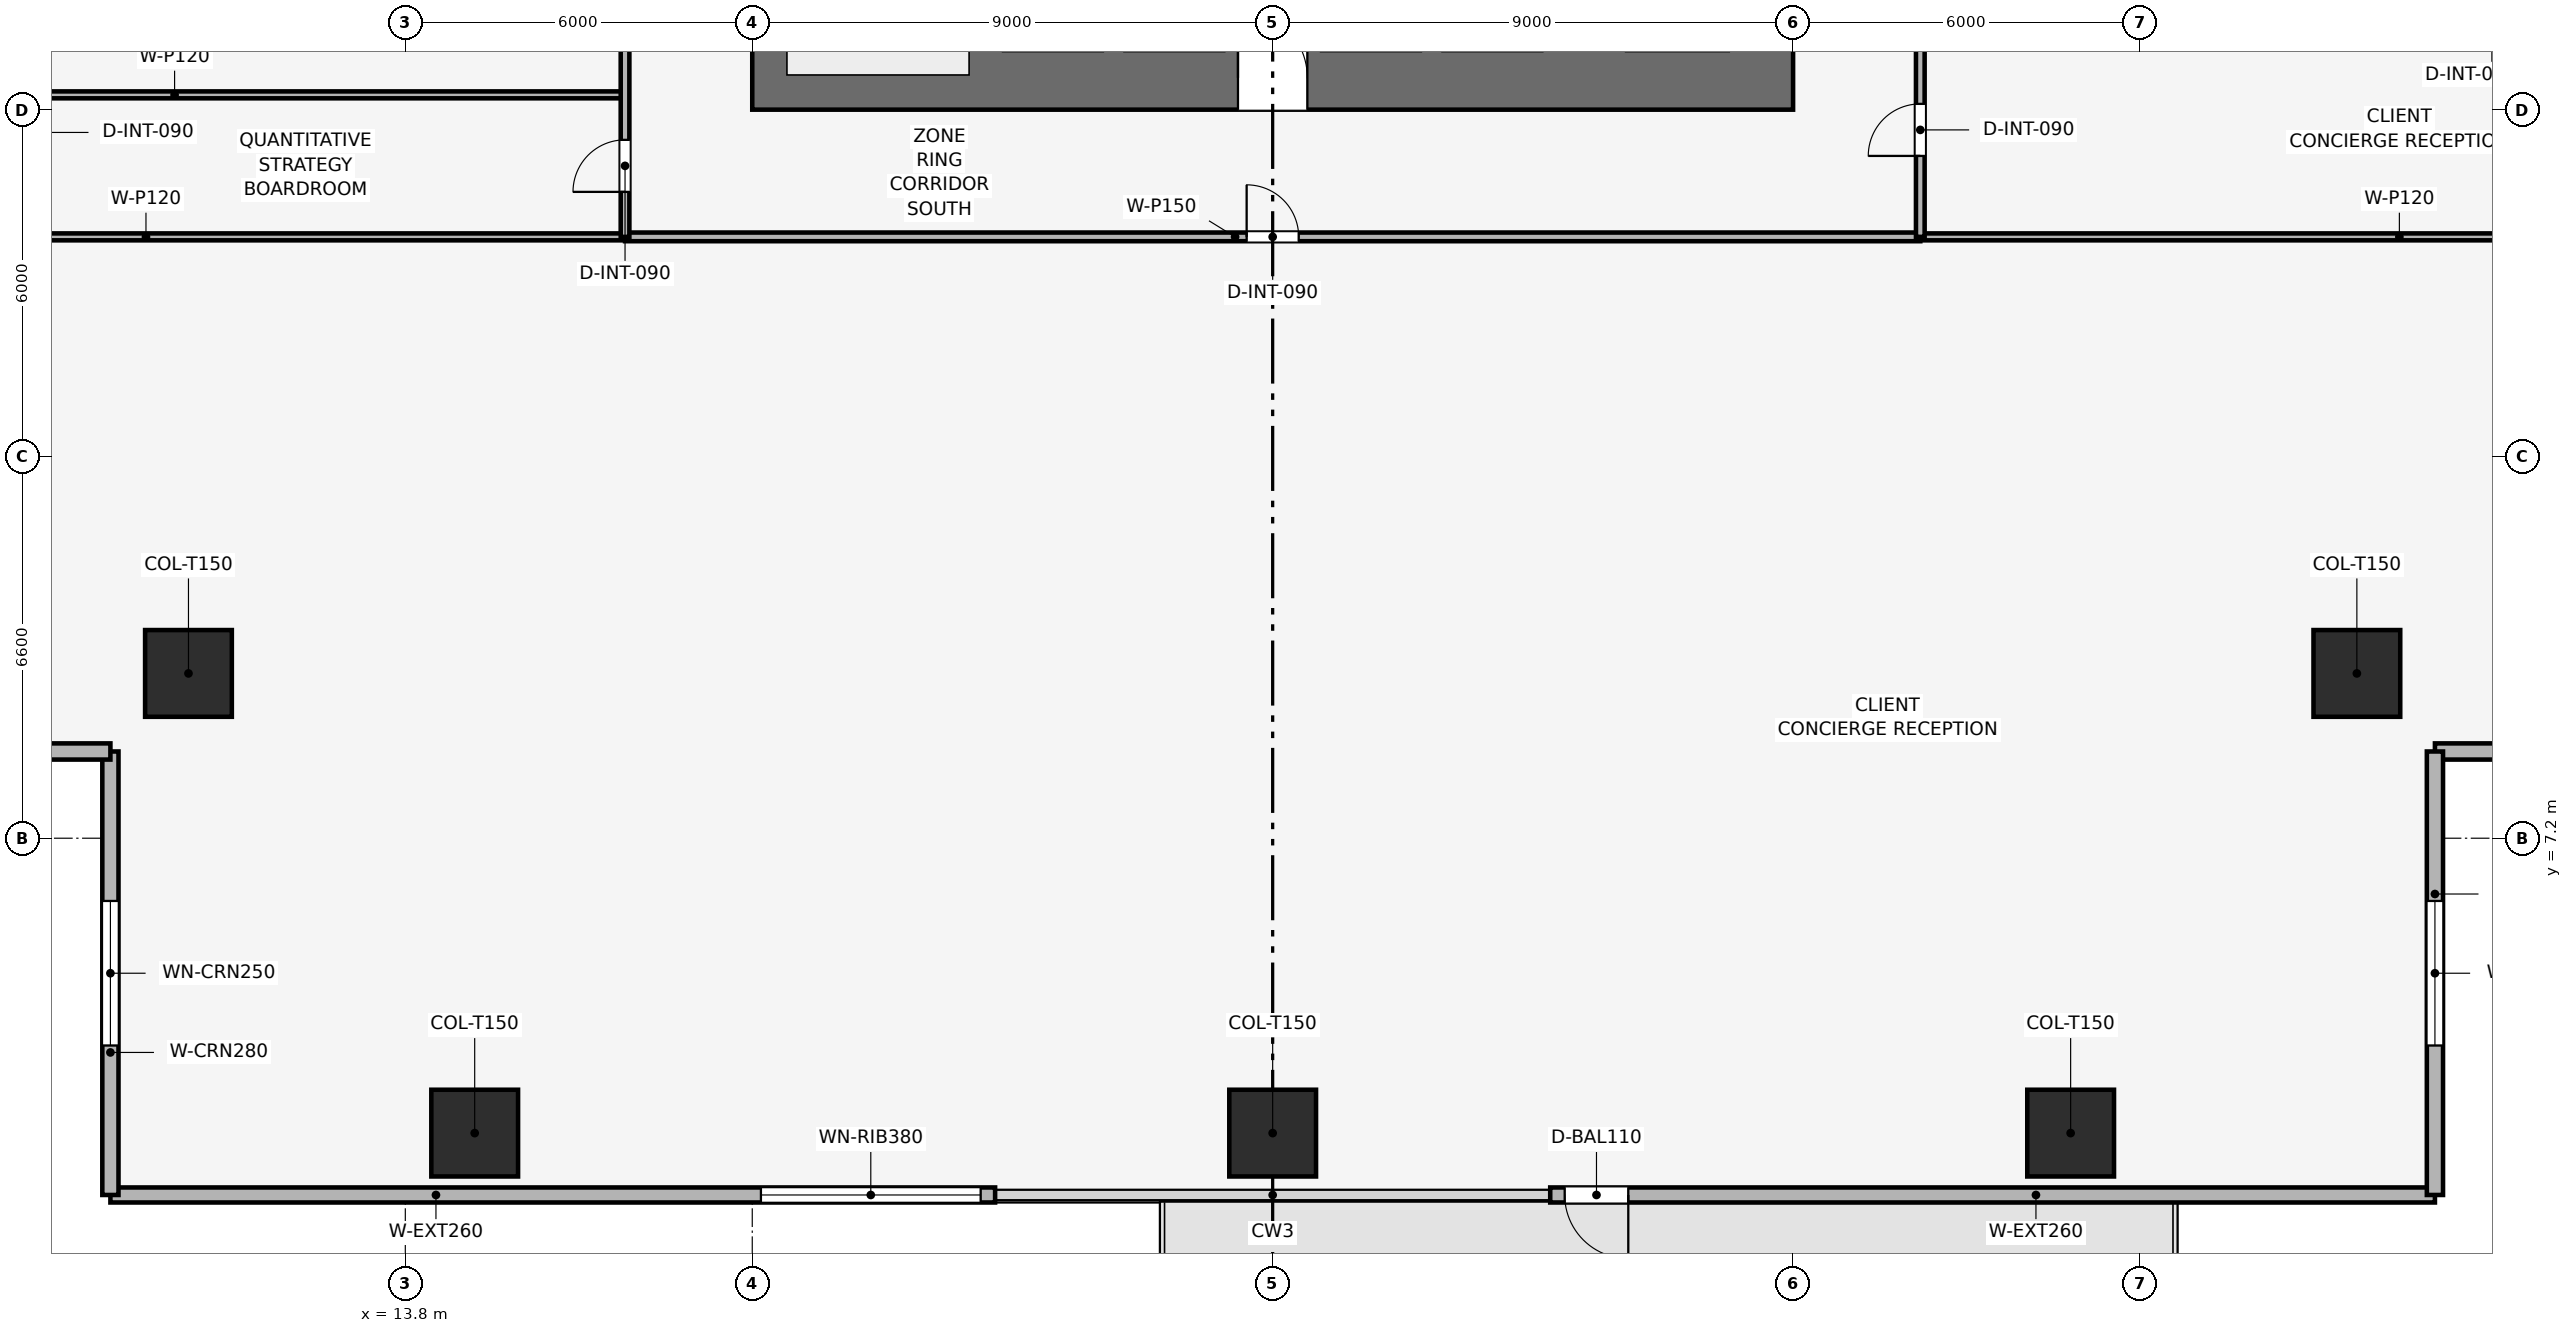
"""IFC4 building model, lengths in metres.
Left out: names, types, materials, properties, quantities, classifications, styles, units other than length and angle.
Written with IfcOpenShell. Run it as: python <this file> out.ifc"""

import sys

from ifc_helpers import new_model, si_unit, direction, frame, frame_2d, origin, origin_2d, place, context, subcontext, project, spatial, rectangle, extrude, element, fill, save


model = new_model("IFC4")
c1 = context("Model", 3, precision=1e-05, world=origin(), true_north=direction((0.0, 1.0)))
c2 = subcontext(c1, "Body", "Model", "MODEL_VIEW")
j1 = project(units=[si_unit("LENGTHUNIT", "METRE"), si_unit("PLANEANGLEUNIT", "RADIAN")], contexts=[c1])
p1 = place(None, origin())
s1 = spatial("IfcSite", under=j1, at=p1, CompositionType="ELEMENT")
p2 = place(p1, origin())
s2 = spatial("IfcBuilding", under=s1, at=p2, CompositionType="ELEMENT")
p3 = place(p2, frame((0.0, 0.0, 45.6)))
s3 = spatial("IfcBuildingStorey", under=s2, at=p3, CompositionType="ELEMENT", Elevation=45.6)
p4 = place(p3, frame((19.8, 20.35, 0.0), z_axis=(0.0, 0.0, 1.0), x_axis=(1.0, 0.0, 0.0)))
e1 = element("IfcWall", 1, at=p4, inside=s3, PredefinedType="SHEAR", context=c2, shape_type="SweptSolid", body=[
    extrude(rectangle(XDim=18.0, YDim=1.1, at=frame_2d((9.0, 0.0))), origin(), (0.0, 0.0, 1.0), 3.9),
])
p5 = place(p4, frame((8.4, 0.0, 0.0)))
e2 = element("IfcOpeningElement", 2, at=p5, cuts=e1, PredefinedType="OPENING", context=c2, shape_type="SweptSolid", body=[
    extrude(rectangle(XDim=1.2, YDim=2.2, at=frame_2d((0.6, 1.1))), frame((0.0, 0.56, 0.0), z_axis=(0.0, -1.0, 0.0), x_axis=(1.0, 0.0, 0.0)), (0.0, 0.0, 1.0), 1.12),
])
for number, where, z_axis, x_axis in (
    (3, (15.0, 2.1, 0.003), (0.0, 0.0, 1.0), (1.0, 0.0, 0.0)),
    (4, (28.8, 2.1, 0.003), (0.0, 0.0, 1.0), (1.0, 0.0, 0.0)),
    (5, (42.6, 2.1, 0.003), (0.0, 0.0, 1.0), (1.0, 0.0, 0.0)),
    (6, (10.05, 10.05, 0.003), (0.0, 0.0, 1.0), (1.0, 0.0, 0.0)),
    (7, (47.55, 10.05, 0.003), (0.0, 0.0, 1.0), (1.0, 0.0, 0.0)),
):
    element("IfcColumn", number, at=place(p3, frame(where, z_axis=z_axis, x_axis=x_axis)), inside=s3, PredefinedType="COLUMN", context=c2, shape_type="SweptSolid", body=[
        extrude(rectangle(XDim=1.5, YDim=1.5, at=origin_2d()), origin(), (0.0, 0.0, 1.0), 3.644),
    ])
p6 = place(p3, frame((48.9, 1.03, 0.0), z_axis=(0.0, 0.0, 1.0), x_axis=(-1.0, 0.0, 0.0)))
e8 = element("IfcWall", 8, at=p6, inside=s3, PredefinedType="SOLIDWALL", context=c2, shape_type="SweptSolid", body=[
    extrude(rectangle(XDim=15.3, YDim=0.26, at=frame_2d((7.65, 0.0))), origin(), (0.0, 0.0, 1.0), 3.65),
])
p7 = place(p6, frame((13.95, 0.0, 0.0)))
e9 = element("IfcOpeningElement", 9, at=p7, cuts=e8, PredefinedType="OPENING", context=c2, shape_type="SweptSolid", body=[
    extrude(rectangle(XDim=1.1, YDim=2.2, at=frame_2d((0.55, 1.1))), frame((0.0, 0.14, 0.0), z_axis=(0.0, -1.0, 0.0), x_axis=(1.0, 0.0, 0.0)), (0.0, 0.0, 1.0), 0.28),
])
p8 = place(p3, frame((24.0, 1.03, 0.0), z_axis=(0.0, 0.0, 1.0), x_axis=(-1.0, 0.0, 0.0)))
e10 = element("IfcWall", 10, at=p8, inside=s3, PredefinedType="SOLIDWALL", context=c2, shape_type="SweptSolid", body=[
    extrude(rectangle(XDim=15.3, YDim=0.26, at=frame_2d((7.65, 0.0))), origin(), (0.0, 0.0, 1.0), 3.65),
])
p9 = place(p8, frame((0.25, 0.0, 0.9)))
e11 = element("IfcOpeningElement", 11, at=p9, cuts=e10, PredefinedType="OPENING", context=c2, shape_type="SweptSolid", body=[
    extrude(rectangle(XDim=3.8, YDim=1.9, at=frame_2d((1.9, 0.95))), frame((0.0, 0.14, 0.0), z_axis=(0.0, -1.0, 0.0), x_axis=(1.0, 0.0, 0.0)), (0.0, 0.0, 1.0), 0.28),
])
p10 = place(p3, frame((8.7, 1.03, 0.0), z_axis=(0.0, 0.0, 1.0), x_axis=(0.0, 1.0, 0.0)))
e12 = element("IfcWall", 12, at=p10, inside=s3, PredefinedType="SOLIDWALL", context=c2, shape_type="SweptSolid", body=[
    extrude(rectangle(XDim=7.67, YDim=0.28, at=frame_2d((3.835, 0.0))), origin(), (0.0, 0.0, 1.0), 3.65),
])
p11 = place(p10, frame((2.585, 0.0, 0.9)))
e13 = element("IfcOpeningElement", 13, at=p11, cuts=e12, PredefinedType="OPENING", context=c2, shape_type="SweptSolid", body=[
    extrude(rectangle(XDim=2.5, YDim=1.9, at=frame_2d((1.25, 0.95))), frame((0.0, 0.15, 0.0), z_axis=(0.0, -1.0, 0.0), x_axis=(1.0, 0.0, 0.0)), (0.0, 0.0, 1.0), 0.3),
])
p12 = place(p3, frame((8.7, 8.7, 0.0), z_axis=(0.0, 0.0, 1.0), x_axis=(-1.0, 0.0, 0.0)))
e14 = element("IfcWall", 14, at=p12, inside=s3, PredefinedType="SOLIDWALL", context=c2, shape_type="SweptSolid", body=[
    extrude(rectangle(XDim=7.67, YDim=0.28, at=frame_2d((3.835, 0.0))), origin(), (0.0, 0.0, 1.0), 3.65),
])
p13 = place(p12, frame((2.585, 0.0, 0.9)))
e15 = element("IfcOpeningElement", 15, at=p13, cuts=e14, PredefinedType="OPENING", context=c2, shape_type="SweptSolid", body=[
    extrude(rectangle(XDim=2.5, YDim=1.9, at=frame_2d((1.25, 0.95))), frame((0.0, 0.15, 0.0), z_axis=(0.0, -1.0, 0.0), x_axis=(1.0, 0.0, 0.0)), (0.0, 0.0, 1.0), 0.3),
])
p14 = place(p3, frame((56.57, 8.7, 0.0), z_axis=(0.0, 0.0, 1.0), x_axis=(-1.0, 0.0, 0.0)))
e16 = element("IfcWall", 16, at=p14, inside=s3, PredefinedType="SOLIDWALL", context=c2, shape_type="SweptSolid", body=[
    extrude(rectangle(XDim=7.67, YDim=0.28, at=frame_2d((3.835, 0.0))), origin(), (0.0, 0.0, 1.0), 3.65),
])
p15 = place(p14, frame((2.585, 0.0, 0.9)))
e17 = element("IfcOpeningElement", 17, at=p15, cuts=e16, PredefinedType="OPENING", context=c2, shape_type="SweptSolid", body=[
    extrude(rectangle(XDim=2.5, YDim=1.9, at=frame_2d((1.25, 0.95))), frame((0.0, 0.15, 0.0), z_axis=(0.0, -1.0, 0.0), x_axis=(1.0, 0.0, 0.0)), (0.0, 0.0, 1.0), 0.3),
])
p16 = place(p3, frame((48.9, 8.7, 0.0), z_axis=(0.0, 0.0, 1.0), x_axis=(0.0, -1.0, 0.0)))
e18 = element("IfcWall", 18, at=p16, inside=s3, PredefinedType="SOLIDWALL", context=c2, shape_type="SweptSolid", body=[
    extrude(rectangle(XDim=7.67, YDim=0.28, at=frame_2d((3.835, 0.0))), origin(), (0.0, 0.0, 1.0), 3.65),
])
p17 = place(p16, frame((2.585, 0.0, 0.9)))
e19 = element("IfcOpeningElement", 19, at=p17, cuts=e18, PredefinedType="OPENING", context=c2, shape_type="SweptSolid", body=[
    extrude(rectangle(XDim=2.5, YDim=1.9, at=frame_2d((1.25, 0.95))), frame((0.0, 0.15, 0.0), z_axis=(0.0, -1.0, 0.0), x_axis=(1.0, 0.0, 0.0)), (0.0, 0.0, 1.0), 0.3),
])
for number, where, z_axis, x_axis in (
    (20, (1.03, 17.6, 0.0), (0.0, 0.0, 1.0), (1.0, 0.0, 0.0)),
    (21, (40.0, 17.6, 0.0), (0.0, 0.0, 1.0), (1.0, 0.0, 0.0)),
    (22, (1.03, 20.056, 0.0), (0.0, 0.0, 1.0), (1.0, 0.0, 0.0)),
):
    element("IfcWall", number, at=place(p3, frame(where, z_axis=z_axis, x_axis=x_axis)), inside=s3, PredefinedType="PARTITIONING", context=c2, shape_type="SweptSolid", body=[
        extrude(rectangle(XDim=16.57, YDim=0.12, at=frame_2d((8.285, 0.0))), origin(), (0.0, 0.0, 1.0), 2.935),
    ])
p18 = place(p3, frame((17.6, 17.6, 0.0), z_axis=(0.0, 0.0, 1.0), x_axis=(1.0, 0.0, 0.0)))
e23 = element("IfcWall", 23, at=p18, inside=s3, PredefinedType="PARTITIONING", context=c2, shape_type="SweptSolid", body=[
    extrude(rectangle(XDim=22.4, YDim=0.15, at=frame_2d((11.2, 0.0))), origin(), (0.0, 0.0, 1.0), 3.085),
])
p19 = place(p18, frame((10.75, 0.0, 0.0)))
e24 = element("IfcOpeningElement", 24, at=p19, cuts=e23, PredefinedType="OPENING", context=c2, shape_type="SweptSolid", body=[
    extrude(rectangle(XDim=0.9, YDim=2.1, at=frame_2d((0.45, 1.05))), frame((0.0, 0.085, 0.0), z_axis=(0.0, -1.0, 0.0), x_axis=(1.0, 0.0, 0.0)), (0.0, 0.0, 1.0), 0.17),
])
p20 = place(p3, frame((17.6, 17.6, 0.0), z_axis=(0.0, 0.0, 1.0), x_axis=(0.0, 1.0, 0.0)))
e25 = element("IfcWall", 25, at=p20, inside=s3, PredefinedType="PARTITIONING", context=c2, shape_type="SweptSolid", body=[
    extrude(rectangle(XDim=22.4, YDim=0.15, at=frame_2d((11.2, 0.0))), origin(), (0.0, 0.0, 1.0), 3.085),
])
p21 = place(p20, frame((0.778, 0.0, 0.0)))
e26 = element("IfcOpeningElement", 26, at=p21, cuts=e25, PredefinedType="OPENING", context=c2, shape_type="SweptSolid", body=[
    extrude(rectangle(XDim=0.9, YDim=2.1, at=frame_2d((0.45, 1.05))), frame((0.0, 0.085, 0.0), z_axis=(0.0, -1.0, 0.0), x_axis=(1.0, 0.0, 0.0)), (0.0, 0.0, 1.0), 0.17),
])
p22 = place(p20, frame((6.372, 0.0, 0.0)))
e27 = element("IfcOpeningElement", 27, at=p22, cuts=e25, PredefinedType="OPENING", context=c2, shape_type="SweptSolid", body=[
    extrude(rectangle(XDim=0.9, YDim=2.1, at=frame_2d((0.45, 1.05))), frame((0.0, 0.085, 0.0), z_axis=(0.0, -1.0, 0.0), x_axis=(1.0, 0.0, 0.0)), (0.0, 0.0, 1.0), 0.17),
])
p23 = place(p20, frame((16.343, 0.0, 0.0)))
e28 = element("IfcOpeningElement", 28, at=p23, cuts=e25, PredefinedType="OPENING", context=c2, shape_type="SweptSolid", body=[
    extrude(rectangle(XDim=0.9, YDim=2.1, at=frame_2d((0.45, 1.05))), frame((0.0, 0.085, 0.0), z_axis=(0.0, -1.0, 0.0), x_axis=(1.0, 0.0, 0.0)), (0.0, 0.0, 1.0), 0.17),
])
p24 = place(p3, frame((40.0, 17.6, 0.0), z_axis=(0.0, 0.0, 1.0), x_axis=(0.0, 1.0, 0.0)))
e29 = element("IfcWall", 29, at=p24, inside=s3, PredefinedType="PARTITIONING", context=c2, shape_type="SweptSolid", body=[
    extrude(rectangle(XDim=22.4, YDim=0.15, at=frame_2d((11.2, 0.0))), origin(), (0.0, 0.0, 1.0), 3.085),
])
p25 = place(p24, frame((1.4, 0.0, 0.0)))
e30 = element("IfcOpeningElement", 30, at=p25, cuts=e29, PredefinedType="OPENING", context=c2, shape_type="SweptSolid", body=[
    extrude(rectangle(XDim=0.9, YDim=2.1, at=frame_2d((0.45, 1.05))), frame((0.0, 0.085, 0.0), z_axis=(0.0, -1.0, 0.0), x_axis=(1.0, 0.0, 0.0)), (0.0, 0.0, 1.0), 0.17),
])
p26 = place(p24, frame((4.65, 0.0, 0.0)))
e31 = element("IfcOpeningElement", 31, at=p26, cuts=e29, PredefinedType="OPENING", context=c2, shape_type="SweptSolid", body=[
    extrude(rectangle(XDim=0.9, YDim=2.1, at=frame_2d((0.45, 1.05))), frame((0.0, 0.085, 0.0), z_axis=(0.0, -1.0, 0.0), x_axis=(1.0, 0.0, 0.0)), (0.0, 0.0, 1.0), 0.17),
])
p27 = place(p24, frame((7.55, 0.0, 0.0)))
e32 = element("IfcOpeningElement", 32, at=p27, cuts=e29, PredefinedType="OPENING", context=c2, shape_type="SweptSolid", body=[
    extrude(rectangle(XDim=0.9, YDim=2.1, at=frame_2d((0.45, 1.05))), frame((0.0, 0.085, 0.0), z_axis=(0.0, -1.0, 0.0), x_axis=(1.0, 0.0, 0.0)), (0.0, 0.0, 1.0), 0.17),
])
p28 = place(p24, frame((10.3, 0.0, 0.0)))
e33 = element("IfcOpeningElement", 33, at=p28, cuts=e29, PredefinedType="OPENING", context=c2, shape_type="SweptSolid", body=[
    extrude(rectangle(XDim=0.95, YDim=2.1, at=frame_2d((0.475, 1.05))), frame((0.0, 0.085, 0.0), z_axis=(0.0, -1.0, 0.0), x_axis=(1.0, 0.0, 0.0)), (0.0, 0.0, 1.0), 0.17),
])
p29 = place(p24, frame((16.8, 0.0, 0.0)))
e34 = element("IfcOpeningElement", 34, at=p29, cuts=e29, PredefinedType="OPENING", context=c2, shape_type="SweptSolid", body=[
    extrude(rectangle(XDim=0.9, YDim=2.1, at=frame_2d((0.45, 1.05))), frame((0.0, 0.085, 0.0), z_axis=(0.0, -1.0, 0.0), x_axis=(1.0, 0.0, 0.0)), (0.0, 0.0, 1.0), 0.17),
])
p30 = place(p7, origin())
e35 = element("IfcDoor", 35, at=p30, inside=s3, OperationType="SINGLE_SWING_LEFT", PredefinedType="DOOR", context=c2, shape_type="SweptSolid", body=[
    extrude(rectangle(XDim=1.1, YDim=2.2, at=frame_2d((0.55, 1.1))), frame((0.0, 0.025, 0.0), z_axis=(0.0, -1.0, 0.0), x_axis=(1.0, 0.0, 0.0)), (0.0, 0.0, 1.0), 0.05),
])
fill(e9, e35)
p31 = place(p9, origin())
e36 = element("IfcWindow", 36, at=p31, inside=s3, PartitioningType="SINGLE_PANEL", PredefinedType="WINDOW", context=c2, shape_type="SweptSolid", body=[
    extrude(rectangle(XDim=3.8, YDim=1.9, at=frame_2d((1.9, 0.95))), frame((0.0, 0.03, 0.0), z_axis=(0.0, -1.0, 0.0), x_axis=(1.0, 0.0, 0.0)), (0.0, 0.0, 1.0), 0.06),
])
fill(e11, e36)
p32 = place(p11, origin())
e37 = element("IfcWindow", 37, at=p32, inside=s3, PartitioningType="SINGLE_PANEL", PredefinedType="WINDOW", context=c2, shape_type="SweptSolid", body=[
    extrude(rectangle(XDim=2.5, YDim=1.9, at=frame_2d((1.25, 0.95))), frame((0.0, 0.03, 0.0), z_axis=(0.0, -1.0, 0.0), x_axis=(1.0, 0.0, 0.0)), (0.0, 0.0, 1.0), 0.06),
])
fill(e13, e37)
p33 = place(p17, origin())
e38 = element("IfcWindow", 38, at=p33, inside=s3, PartitioningType="SINGLE_PANEL", PredefinedType="WINDOW", context=c2, shape_type="SweptSolid", body=[
    extrude(rectangle(XDim=2.5, YDim=1.9, at=frame_2d((1.25, 0.95))), frame((0.0, 0.03, 0.0), z_axis=(0.0, -1.0, 0.0), x_axis=(1.0, 0.0, 0.0)), (0.0, 0.0, 1.0), 0.06),
])
fill(e19, e38)
p34 = place(p19, origin())
e39 = element("IfcDoor", 39, at=p34, inside=s3, OperationType="SINGLE_SWING_LEFT", PredefinedType="DOOR", context=c2, shape_type="SweptSolid", body=[
    extrude(rectangle(XDim=0.9, YDim=2.1, at=frame_2d((0.45, 1.05))), frame((0.0, 0.025, 0.0), z_axis=(0.0, -1.0, 0.0), x_axis=(1.0, 0.0, 0.0)), (0.0, 0.0, 1.0), 0.05),
])
fill(e24, e39)
p35 = place(p21, origin())
e40 = element("IfcDoor", 40, at=p35, inside=s3, OperationType="SINGLE_SWING_LEFT", PredefinedType="DOOR", context=c2, shape_type="SweptSolid", body=[
    extrude(rectangle(XDim=0.9, YDim=2.1, at=frame_2d((0.45, 1.05))), frame((0.0, 0.025, 0.0), z_axis=(0.0, -1.0, 0.0), x_axis=(1.0, 0.0, 0.0)), (0.0, 0.0, 1.0), 0.05),
])
fill(e26, e40)
p36 = place(p25, origin())
e41 = element("IfcDoor", 41, at=p36, inside=s3, OperationType="SINGLE_SWING_LEFT", PredefinedType="DOOR", context=c2, shape_type="SweptSolid", body=[
    extrude(rectangle(XDim=0.9, YDim=2.1, at=frame_2d((0.45, 1.05))), frame((0.0, 0.025, 0.0), z_axis=(0.0, -1.0, 0.0), x_axis=(1.0, 0.0, 0.0)), (0.0, 0.0, 1.0), 0.05),
])
fill(e30, e41)
p37 = place(p5, origin())
e42 = element("IfcDoor", 42, at=p37, inside=s3, OperationType="SINGLE_SWING_LEFT", PredefinedType="DOOR", context=c2, shape_type="SweptSolid", body=[
    extrude(rectangle(XDim=1.2, YDim=2.2, at=frame_2d((0.6, 1.1))), frame((0.0, 0.025, 0.0), z_axis=(0.0, -1.0, 0.0), x_axis=(1.0, 0.0, 0.0)), (0.0, 0.0, 1.0), 0.05),
])
fill(e2, e42)
save(model, sys.argv[1])
